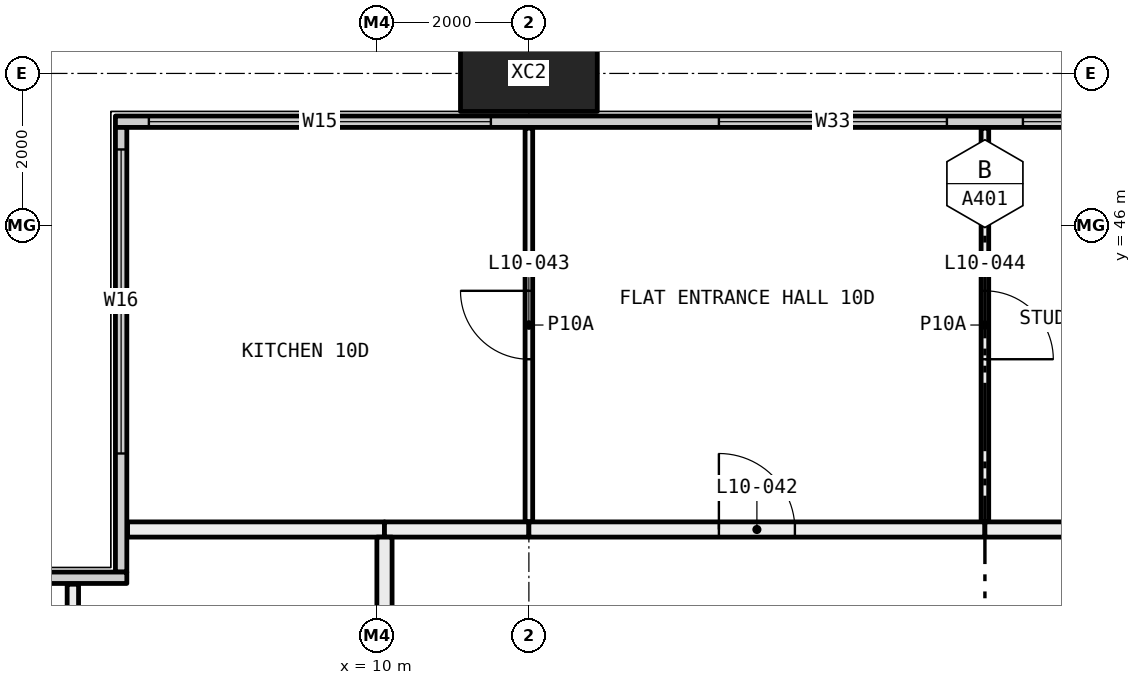
"""IFC4 building model, lengths in metres.
Left out: names, types, materials, properties, quantities, classifications, styles, units other than length and angle.
Written with IfcOpenShell. Run it as: python <this file> out.ifc"""

import sys

from ifc_helpers import new_model, si_unit, direction, frame, frame_2d, origin, origin_2d, place, context, subcontext, project, spatial, rectangle, hollow_rectangle, extrude, element, fill, save


model = new_model("IFC4")
c1 = context("Model", 3, precision=1e-05, world=origin(), true_north=direction((0.0, 1.0)))
c2 = subcontext(c1, "Body", "Model", "MODEL_VIEW")
j1 = project(units=[si_unit("LENGTHUNIT", "METRE"), si_unit("PLANEANGLEUNIT", "RADIAN")], contexts=[c1])
p1 = place(None, origin())
s1 = spatial("IfcSite", under=j1, at=p1, CompositionType="ELEMENT")
p2 = place(p1, origin())
s2 = spatial("IfcBuilding", under=s1, at=p2, CompositionType="ELEMENT")
p3 = place(p2, frame((0.0, 0.0, 47.25)))
s3 = spatial("IfcBuildingStorey", under=s2, at=p3, CompositionType="ELEMENT", Elevation=47.25)
p4 = place(p3, frame((12.0, 48.0, -0.4), z_axis=(0.0, 0.0, 1.0), x_axis=(1.0, 0.0, 0.0)))
e1 = element("IfcColumn", 1, at=p4, inside=s3, PredefinedType="COLUMN", context=c2, shape_type="SweptSolid", body=[
    extrude(hollow_rectangle(XDim=1.8, YDim=1.0, WallThickness=0.07, at=origin_2d()), origin(), (0.0, 0.0, 1.0), 3.45),
])
p5 = place(p3, frame((6.56, 47.365, 0.0), z_axis=(0.0, 0.0, 1.0), x_axis=(1.0, 0.0, 0.0)))
e2 = element("IfcWall", 2, at=p5, inside=s3, PredefinedType="ELEMENTEDWALL", context=c2, shape_type="SweptSolid", body=[
    extrude(rectangle(XDim=58.88, YDim=0.15, at=frame_2d((29.44, 0.0))), origin(), (0.0, 0.0, 1.0), 3.05),
])
p6 = place(p5, frame((0.44, 0.0, 0.45)))
e3 = element("IfcOpeningElement", 3, at=p6, cuts=e2, PredefinedType="OPENING", context=c2, shape_type="SweptSolid", body=[
    extrude(rectangle(XDim=4.5, YDim=2.55, at=frame_2d((2.25, 1.275))), frame((0.0, 0.085, 0.0), z_axis=(0.0, -1.0, 0.0), x_axis=(1.0, 0.0, 0.0)), (0.0, 0.0, 1.0), 0.17),
])
p7 = place(p5, frame((7.94, 0.0, 0.45)))
e4 = element("IfcOpeningElement", 4, at=p7, cuts=e2, PredefinedType="OPENING", context=c2, shape_type="SweptSolid", body=[
    extrude(rectangle(XDim=3.0, YDim=2.55, at=frame_2d((1.5, 1.275))), frame((0.0, 0.085, 0.0), z_axis=(0.0, -1.0, 0.0), x_axis=(1.0, 0.0, 0.0)), (0.0, 0.0, 1.0), 0.17),
])
p8 = place(p5, frame((11.94, 0.0, 0.45)))
e5 = element("IfcOpeningElement", 5, at=p8, cuts=e2, PredefinedType="OPENING", context=c2, shape_type="SweptSolid", body=[
    extrude(rectangle(XDim=3.0, YDim=2.55, at=frame_2d((1.5, 1.275))), frame((0.0, 0.085, 0.0), z_axis=(0.0, -1.0, 0.0), x_axis=(1.0, 0.0, 0.0)), (0.0, 0.0, 1.0), 0.17),
])
p9 = place(p5, frame((19.94, 0.0, 0.45)))
e6 = element("IfcOpeningElement", 6, at=p9, cuts=e2, PredefinedType="OPENING", context=c2, shape_type="SweptSolid", body=[
    extrude(rectangle(XDim=3.0, YDim=2.55, at=frame_2d((1.5, 1.275))), frame((0.0, 0.085, 0.0), z_axis=(0.0, -1.0, 0.0), x_axis=(1.0, 0.0, 0.0)), (0.0, 0.0, 1.0), 0.17),
])
p10 = place(p5, frame((23.94, 0.0, 0.45)))
e7 = element("IfcOpeningElement", 7, at=p10, cuts=e2, PredefinedType="OPENING", context=c2, shape_type="SweptSolid", body=[
    extrude(rectangle(XDim=2.0, YDim=2.55, at=frame_2d((1.0, 1.275))), frame((0.0, 0.085, 0.0), z_axis=(0.0, -1.0, 0.0), x_axis=(1.0, 0.0, 0.0)), (0.0, 0.0, 1.0), 0.17),
])
p11 = place(p5, frame((31.94, 0.0, 0.45)))
e8 = element("IfcOpeningElement", 8, at=p11, cuts=e2, PredefinedType="OPENING", context=c2, shape_type="SweptSolid", body=[
    extrude(rectangle(XDim=3.0, YDim=2.55, at=frame_2d((1.5, 1.275))), frame((0.0, 0.085, 0.0), z_axis=(0.0, -1.0, 0.0), x_axis=(1.0, 0.0, 0.0)), (0.0, 0.0, 1.0), 0.17),
])
p12 = place(p5, frame((35.94, 0.0, 0.45)))
e9 = element("IfcOpeningElement", 9, at=p12, cuts=e2, PredefinedType="OPENING", context=c2, shape_type="SweptSolid", body=[
    extrude(rectangle(XDim=3.0, YDim=2.55, at=frame_2d((1.5, 1.275))), frame((0.0, 0.085, 0.0), z_axis=(0.0, -1.0, 0.0), x_axis=(1.0, 0.0, 0.0)), (0.0, 0.0, 1.0), 0.17),
])
p13 = place(p5, frame((43.94, 0.0, 0.45)))
e10 = element("IfcOpeningElement", 10, at=p13, cuts=e2, PredefinedType="OPENING", context=c2, shape_type="SweptSolid", body=[
    extrude(rectangle(XDim=3.0, YDim=2.55, at=frame_2d((1.5, 1.275))), frame((0.0, 0.085, 0.0), z_axis=(0.0, -1.0, 0.0), x_axis=(1.0, 0.0, 0.0)), (0.0, 0.0, 1.0), 0.17),
])
p14 = place(p5, frame((47.94, 0.0, 0.45)))
e11 = element("IfcOpeningElement", 11, at=p14, cuts=e2, PredefinedType="OPENING", context=c2, shape_type="SweptSolid", body=[
    extrude(rectangle(XDim=2.0, YDim=2.55, at=frame_2d((1.0, 1.275))), frame((0.0, 0.085, 0.0), z_axis=(0.0, -1.0, 0.0), x_axis=(1.0, 0.0, 0.0)), (0.0, 0.0, 1.0), 0.17),
])
p15 = place(p5, frame((53.94, 0.0, 0.45)))
e12 = element("IfcOpeningElement", 12, at=p15, cuts=e2, PredefinedType="OPENING", context=c2, shape_type="SweptSolid", body=[
    extrude(rectangle(XDim=4.5, YDim=2.55, at=frame_2d((2.25, 1.275))), frame((0.0, 0.085, 0.0), z_axis=(0.0, -1.0, 0.0), x_axis=(1.0, 0.0, 0.0)), (0.0, 0.0, 1.0), 0.17),
])
p16 = place(p3, frame((6.635, 41.44, 0.0), z_axis=(0.0, 0.0, 1.0), x_axis=(0.0, 1.0, 0.0)))
e13 = element("IfcWall", 13, at=p16, inside=s3, PredefinedType="ELEMENTEDWALL", context=c2, shape_type="SweptSolid", body=[
    extrude(rectangle(XDim=5.85, YDim=0.15, at=frame_2d((2.925, 0.0))), origin(), (0.0, 0.0, 1.0), 3.05),
])
p17 = place(p16, frame((1.56, 0.0, 0.45)))
e14 = element("IfcOpeningElement", 14, at=p17, cuts=e13, PredefinedType="OPENING", context=c2, shape_type="SweptSolid", body=[
    extrude(rectangle(XDim=4.0, YDim=2.55, at=frame_2d((2.0, 1.275))), frame((0.0, 0.085, 0.0), z_axis=(0.0, -1.0, 0.0), x_axis=(1.0, 0.0, 0.0)), (0.0, 0.0, 1.0), 0.17),
])
p18 = place(p3, frame((0.56, 41.365, 0.0), z_axis=(0.0, 0.0, 1.0), x_axis=(1.0, 0.0, 0.0)))
e15 = element("IfcWall", 15, at=p18, inside=s3, PredefinedType="ELEMENTEDWALL", context=c2, shape_type="SweptSolid", body=[
    extrude(rectangle(XDim=6.15, YDim=0.15, at=frame_2d((3.075, 0.0))), origin(), (0.0, 0.0, 1.0), 3.05),
])
p19 = place(p18, frame((0.44, 0.0, 0.45)))
e16 = element("IfcOpeningElement", 16, at=p19, cuts=e15, PredefinedType="OPENING", context=c2, shape_type="SweptSolid", body=[
    extrude(rectangle(XDim=4.0, YDim=2.55, at=frame_2d((2.0, 1.275))), frame((0.0, 0.085, 0.0), z_axis=(0.0, -1.0, 0.0), x_axis=(1.0, 0.0, 0.0)), (0.0, 0.0, 1.0), 0.17),
])
p20 = place(p3, frame((12.0, 42.1, 0.0), z_axis=(0.0, 0.0, 1.0), x_axis=(0.0, 1.0, 0.0)))
e17 = element("IfcWall", 17, at=p20, inside=s3, PredefinedType="PARTITIONING", context=c2, shape_type="SweptSolid", body=[
    extrude(rectangle(XDim=5.18, YDim=0.1, at=frame_2d((2.59, 0.0))), origin(), (0.0, 0.0, 1.0), 3.05),
])
p21 = place(p20, frame((2.14, 0.0, 0.0)))
e18 = element("IfcOpeningElement", 18, at=p21, cuts=e17, PredefinedType="OPENING", context=c2, shape_type="SweptSolid", body=[
    extrude(rectangle(XDim=0.9, YDim=2.1, at=frame_2d((0.45, 1.05))), frame((0.0, 0.06, 0.0), z_axis=(0.0, -1.0, 0.0), x_axis=(1.0, 0.0, 0.0)), (0.0, 0.0, 1.0), 0.12),
])
p22 = place(p3, frame((6.72, 42.0, 0.0), z_axis=(0.0, 0.0, 1.0), x_axis=(1.0, 0.0, 0.0)))
e19 = element("IfcWall", 19, at=p22, inside=s3, PredefinedType="PARTITIONING", context=c2, shape_type="SweptSolid", body=[
    extrude(rectangle(XDim=3.38, YDim=0.2, at=frame_2d((1.69, 0.0))), origin(), (0.0, 0.0, 1.0), 3.05),
])
p23 = place(p3, frame((10.1, 42.0, 0.0), z_axis=(0.0, 0.0, 1.0), x_axis=(1.0, 0.0, 0.0)))
e20 = element("IfcWall", 20, at=p23, inside=s3, PredefinedType="PARTITIONING", context=c2, shape_type="SweptSolid", body=[
    extrude(rectangle(XDim=1.9, YDim=0.2, at=frame_2d((0.95, 0.0))), origin(), (0.0, 0.0, 1.0), 3.05),
])
p24 = place(p3, frame((18.0, 42.1, 0.0), z_axis=(0.0, 0.0, 1.0), x_axis=(0.0, 1.0, 0.0)))
e21 = element("IfcWall", 21, at=p24, inside=s3, PredefinedType="PARTITIONING", context=c2, shape_type="SweptSolid", body=[
    extrude(rectangle(XDim=5.18, YDim=0.1, at=frame_2d((2.59, 0.0))), origin(), (0.0, 0.0, 1.0), 3.05),
])
p25 = place(p24, frame((2.14, 0.0, 0.0)))
e22 = element("IfcOpeningElement", 22, at=p25, cuts=e21, PredefinedType="OPENING", context=c2, shape_type="SweptSolid", body=[
    extrude(rectangle(XDim=0.9, YDim=2.1, at=frame_2d((0.45, 1.05))), frame((0.0, 0.06, 0.0), z_axis=(0.0, -1.0, 0.0), x_axis=(1.0, 0.0, 0.0)), (0.0, 0.0, 1.0), 0.12),
])
p26 = place(p3, frame((12.0, 42.0, 0.0), z_axis=(0.0, 0.0, 1.0), x_axis=(1.0, 0.0, 0.0)))
e23 = element("IfcWall", 23, at=p26, inside=s3, PredefinedType="PARTITIONING", context=c2, shape_type="SweptSolid", body=[
    extrude(rectangle(XDim=6.0, YDim=0.2, at=frame_2d((3.0, 0.0))), origin(), (0.0, 0.0, 1.0), 3.05),
])
p27 = place(p26, frame((2.5, 0.0, 0.0)))
e24 = element("IfcOpeningElement", 24, at=p27, cuts=e23, PredefinedType="OPENING", context=c2, shape_type="SweptSolid", body=[
    extrude(rectangle(XDim=1.0, YDim=2.1, at=frame_2d((0.5, 1.05))), frame((0.0, 0.11, 0.0), z_axis=(0.0, -1.0, 0.0), x_axis=(1.0, 0.0, 0.0)), (0.0, 0.0, 1.0), 0.22),
])
p28 = place(p3, frame((18.0, 42.0, 0.0), z_axis=(0.0, 0.0, 1.0), x_axis=(1.0, 0.0, 0.0)))
e25 = element("IfcWall", 25, at=p28, inside=s3, PredefinedType="PARTITIONING", context=c2, shape_type="SweptSolid", body=[
    extrude(rectangle(XDim=6.0, YDim=0.2, at=frame_2d((3.0, 0.0))), origin(), (0.0, 0.0, 1.0), 3.05),
])
p29 = place(p3, frame((6.0, 37.5, 0.0), z_axis=(0.0, 0.0, 1.0), x_axis=(0.0, 1.0, 0.0)))
e26 = element("IfcWall", 26, at=p29, inside=s3, PredefinedType="PARTITIONING", context=c2, shape_type="SweptSolid", body=[
    extrude(rectangle(XDim=3.78, YDim=0.15, at=frame_2d((1.89, 0.0))), origin(), (0.0, 0.0, 1.0), 3.05),
])
p30 = place(p3, frame((10.1, 37.5, 0.0), z_axis=(0.0, 0.0, 1.0), x_axis=(0.0, 1.0, 0.0)))
e27 = element("IfcWall", 27, at=p30, inside=s3, PredefinedType="PARTITIONING", context=c2, shape_type="SweptSolid", body=[
    extrude(rectangle(XDim=4.4, YDim=0.2, at=frame_2d((2.2, 0.0))), origin(), (0.0, 0.0, 1.0), 3.05),
])
p31 = place(p6, origin())
e28 = element("IfcWindow", 28, at=p31, inside=s3, PartitioningType="SINGLE_PANEL", PredefinedType="WINDOW", context=c2, shape_type="SweptSolid", body=[
    extrude(rectangle(XDim=4.5, YDim=2.55, at=frame_2d((2.25, 1.275))), frame((0.0, 0.03, 0.0), z_axis=(0.0, -1.0, 0.0), x_axis=(1.0, 0.0, 0.0)), (0.0, 0.0, 1.0), 0.06),
])
fill(e3, e28)
p32 = place(p7, origin())
e29 = element("IfcWindow", 29, at=p32, inside=s3, PartitioningType="SINGLE_PANEL", PredefinedType="WINDOW", context=c2, shape_type="SweptSolid", body=[
    extrude(rectangle(XDim=3.0, YDim=2.55, at=frame_2d((1.5, 1.275))), frame((0.0, 0.03, 0.0), z_axis=(0.0, -1.0, 0.0), x_axis=(1.0, 0.0, 0.0)), (0.0, 0.0, 1.0), 0.06),
])
fill(e4, e29)
p33 = place(p8, origin())
e30 = element("IfcWindow", 30, at=p33, inside=s3, PartitioningType="SINGLE_PANEL", PredefinedType="WINDOW", context=c2, shape_type="SweptSolid", body=[
    extrude(rectangle(XDim=3.0, YDim=2.55, at=frame_2d((1.5, 1.275))), frame((0.0, 0.03, 0.0), z_axis=(0.0, -1.0, 0.0), x_axis=(1.0, 0.0, 0.0)), (0.0, 0.0, 1.0), 0.06),
])
fill(e5, e30)
p34 = place(p17, origin())
e31 = element("IfcWindow", 31, at=p34, inside=s3, PartitioningType="SINGLE_PANEL", PredefinedType="WINDOW", context=c2, shape_type="SweptSolid", body=[
    extrude(rectangle(XDim=4.0, YDim=2.55, at=frame_2d((2.0, 1.275))), frame((0.0, 0.03, 0.0), z_axis=(0.0, -1.0, 0.0), x_axis=(1.0, 0.0, 0.0)), (0.0, 0.0, 1.0), 0.06),
])
fill(e14, e31)
p35 = place(p27, origin())
e32 = element("IfcDoor", 32, at=p35, inside=s3, OperationType="SINGLE_SWING_RIGHT", PredefinedType="DOOR", context=c2, shape_type="SweptSolid", body=[
    extrude(rectangle(XDim=1.0, YDim=2.1, at=frame_2d((0.5, 1.05))), frame((0.0, 0.025, 0.0), z_axis=(0.0, -1.0, 0.0), x_axis=(1.0, 0.0, 0.0)), (0.0, 0.0, 1.0), 0.05),
])
fill(e24, e32)
p36 = place(p21, origin())
e33 = element("IfcDoor", 33, at=p36, inside=s3, OperationType="SINGLE_SWING_LEFT", PredefinedType="DOOR", context=c2, shape_type="SweptSolid", body=[
    extrude(rectangle(XDim=0.9, YDim=2.1, at=frame_2d((0.45, 1.05))), frame((0.0, 0.025, 0.0), z_axis=(0.0, -1.0, 0.0), x_axis=(1.0, 0.0, 0.0)), (0.0, 0.0, 1.0), 0.05),
])
fill(e18, e33)
p37 = place(p25, frame((0.9, 0.0, 0.0), x_axis=(-1.0, 0.0, 0.0)))
e34 = element("IfcDoor", 34, at=p37, inside=s3, OperationType="SINGLE_SWING_LEFT", PredefinedType="DOOR", context=c2, shape_type="SweptSolid", body=[
    extrude(rectangle(XDim=0.9, YDim=2.1, at=frame_2d((0.45, 1.05))), frame((0.0, 0.025, 0.0), z_axis=(0.0, -1.0, 0.0), x_axis=(1.0, 0.0, 0.0)), (0.0, 0.0, 1.0), 0.05),
])
fill(e22, e34)
save(model, sys.argv[1])
